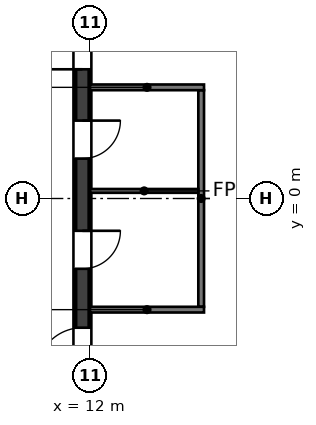
"""IFC4 building model, lengths in metres.
Left out: names, types, materials, properties, quantities, classifications, styles, units other than length and angle.
Written with IfcOpenShell. Run it as: python <this file> out.ifc"""

import sys

from ifc_helpers import new_model, si_unit, direction, frame, frame_2d, origin, place, context, subcontext, project, spatial, rectangle, extrude, element, fill, save


model = new_model("IFC4")
c1 = context("Model", 3, precision=1e-05, world=origin(), true_north=direction((0.0, 1.0)))
c2 = subcontext(c1, "Body", "Model", "MODEL_VIEW")
j1 = project(units=[si_unit("LENGTHUNIT", "METRE"), si_unit("PLANEANGLEUNIT", "RADIAN")], contexts=[c1])
p1 = place(None, origin())
s1 = spatial("IfcSite", under=j1, at=p1, CompositionType="ELEMENT")
p2 = place(p1, origin())
s2 = spatial("IfcBuilding", under=s1, at=p2, CompositionType="ELEMENT")
p3 = place(p2, frame((0.0, 0.0, 299.0)))
s3 = spatial("IfcBuildingStorey", under=s2, at=p3, CompositionType="ELEMENT", Elevation=299.0)
p4 = place(p3, frame((11.8, -5.5, 0.0), z_axis=(0.0, 0.0, 1.0), x_axis=(0.0, 1.0, 0.0)))
e1 = element("IfcWall", 1, at=p4, inside=s3, PredefinedType="SHEAR", context=c2, shape_type="SweptSolid", body=[
    extrude(rectangle(XDim=11.0, YDim=0.4, at=frame_2d((5.5, 0.0))), origin(), (0.0, 0.0, 1.0), 5.4),
])
p5 = place(p4, frame((3.65, 0.0, 0.0)))
e2 = element("IfcOpeningElement", 2, at=p5, cuts=e1, PredefinedType="OPENING", context=c2, shape_type="SweptSolid", body=[
    extrude(rectangle(XDim=1.0, YDim=2.1, at=frame_2d((0.5, 1.05))), frame((0.0, 0.2, 0.0), z_axis=(0.0, -1.0, 0.0), x_axis=(1.0, 0.0, 0.0)), (0.0, 0.0, 1.0), 0.4),
])
p6 = place(p4, frame((6.55, 0.0, 0.0)))
e3 = element("IfcOpeningElement", 3, at=p6, cuts=e1, PredefinedType="OPENING", context=c2, shape_type="SweptSolid", body=[
    extrude(rectangle(XDim=1.0, YDim=2.1, at=frame_2d((0.5, 1.05))), frame((0.0, 0.2, 0.0), z_axis=(0.0, -1.0, 0.0), x_axis=(1.0, 0.0, 0.0)), (0.0, 0.0, 1.0), 0.4),
])
p7 = place(p4, frame((0.9, 0.0, 0.0)))
e4 = element("IfcOpeningElement", 4, at=p7, cuts=e1, PredefinedType="OPENING", context=c2, shape_type="SweptSolid", body=[
    extrude(rectangle(XDim=1.2, YDim=2.1, at=frame_2d((0.6, 1.05))), frame((0.0, 0.2, 0.0), z_axis=(0.0, -1.0, 0.0), x_axis=(1.0, 0.0, 0.0)), (0.0, 0.0, 1.0), 0.4),
])
p8 = place(p4, frame((8.9, 0.0, 0.0)))
e5 = element("IfcOpeningElement", 5, at=p8, cuts=e1, PredefinedType="OPENING", context=c2, shape_type="SweptSolid", body=[
    extrude(rectangle(XDim=1.2, YDim=2.1, at=frame_2d((0.6, 1.05))), frame((0.0, 0.2, 0.0), z_axis=(0.0, -1.0, 0.0), x_axis=(1.0, 0.0, 0.0)), (0.0, 0.0, 1.0), 0.4),
])
p9 = place(p3, frame((14.925, -2.85, 0.0), z_axis=(0.0, 0.0, 1.0), x_axis=(0.0, 1.0, 0.0)))
e6 = element("IfcWall", 6, at=p9, inside=s3, PredefinedType="PARTITIONING", context=c2, shape_type="SweptSolid", body=[
    extrude(rectangle(XDim=5.7, YDim=0.15, at=frame_2d((2.85, 0.0))), origin(), (0.0, 0.0, 1.0), 4.277),
])
p10 = place(p3, frame((12.0, 2.925, 0.0), z_axis=(0.0, 0.0, 1.0), x_axis=(1.0, 0.0, 0.0)))
e7 = element("IfcWall", 7, at=p10, inside=s3, PredefinedType="PARTITIONING", context=c2, shape_type="SweptSolid", body=[
    extrude(rectangle(XDim=3.0, YDim=0.15, at=frame_2d((1.5, 0.0))), origin(), (0.0, 0.0, 1.0), 4.476),
])
p11 = place(p3, frame((12.0, -2.925, 0.0), z_axis=(0.0, 0.0, 1.0), x_axis=(1.0, 0.0, 0.0)))
e8 = element("IfcWall", 8, at=p11, inside=s3, PredefinedType="PARTITIONING", context=c2, shape_type="SweptSolid", body=[
    extrude(rectangle(XDim=3.0, YDim=0.15, at=frame_2d((1.5, 0.0))), origin(), (0.0, 0.0, 1.0), 4.426),
])
p12 = place(p3, frame((12.0, 0.2, 0.0), z_axis=(0.0, 0.0, 1.0), x_axis=(1.0, 0.0, 0.0)))
e9 = element("IfcWall", 9, at=p12, inside=s3, PredefinedType="PARTITIONING", context=c2, shape_type="SweptSolid", body=[
    extrude(rectangle(XDim=2.85, YDim=0.1, at=frame_2d((1.425, 0.0))), origin(), (0.0, 0.0, 1.0), 5.25),
])
p13 = place(p5, origin())
e10 = element("IfcDoor", 10, at=p13, inside=s3, OperationType="SINGLE_SWING_RIGHT", PredefinedType="DOOR", context=c2, shape_type="SweptSolid", body=[
    extrude(rectangle(XDim=1.0, YDim=2.1, at=frame_2d((0.5, 1.05))), frame((0.0, 0.025, 0.0), z_axis=(0.0, -1.0, 0.0), x_axis=(1.0, 0.0, 0.0)), (0.0, 0.0, 1.0), 0.05),
])
fill(e2, e10)
p14 = place(p6, origin())
e11 = element("IfcDoor", 11, at=p14, inside=s3, OperationType="SINGLE_SWING_RIGHT", PredefinedType="DOOR", context=c2, shape_type="SweptSolid", body=[
    extrude(rectangle(XDim=1.0, YDim=2.1, at=frame_2d((0.5, 1.05))), frame((0.0, 0.025, 0.0), z_axis=(0.0, -1.0, 0.0), x_axis=(1.0, 0.0, 0.0)), (0.0, 0.0, 1.0), 0.05),
])
fill(e3, e11)
p15 = place(p7, origin())
e12 = element("IfcDoor", 12, at=p15, inside=s3, OperationType="SINGLE_SWING_LEFT", PredefinedType="DOOR", context=c2, shape_type="SweptSolid", body=[
    extrude(rectangle(XDim=1.2, YDim=2.1, at=frame_2d((0.6, 1.05))), frame((0.0, 0.025, 0.0), z_axis=(0.0, -1.0, 0.0), x_axis=(1.0, 0.0, 0.0)), (0.0, 0.0, 1.0), 0.05),
])
fill(e4, e12)
p16 = place(p8, origin())
e13 = element("IfcDoor", 13, at=p16, inside=s3, OperationType="SINGLE_SWING_LEFT", PredefinedType="DOOR", context=c2, shape_type="SweptSolid", body=[
    extrude(rectangle(XDim=1.2, YDim=2.1, at=frame_2d((0.6, 1.05))), frame((0.0, 0.025, 0.0), z_axis=(0.0, -1.0, 0.0), x_axis=(1.0, 0.0, 0.0)), (0.0, 0.0, 1.0), 0.05),
])
fill(e5, e13)
save(model, sys.argv[1])
